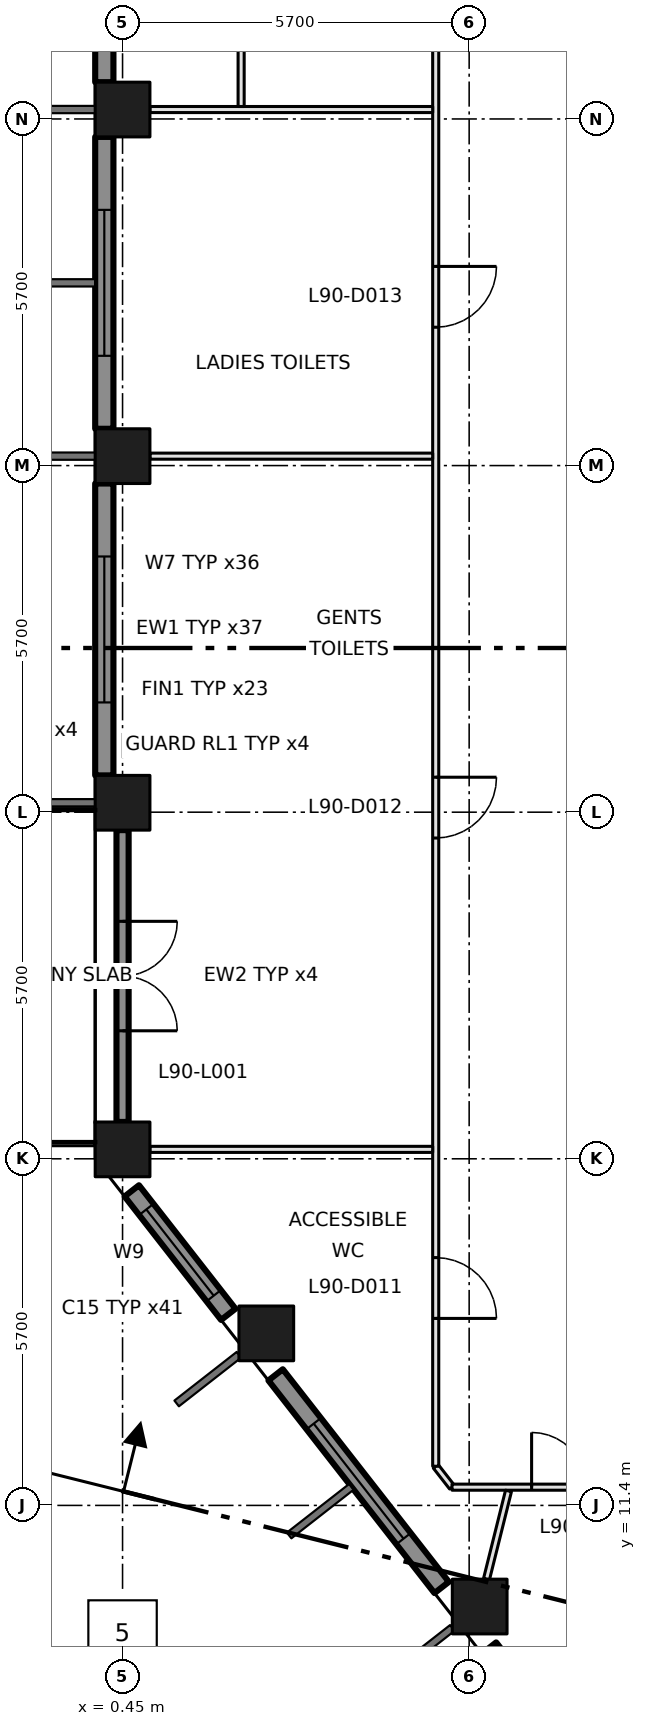
"""IFC4 building model, lengths in metres.
Left out: names, types, materials, properties, quantities, classifications, styles, units other than length and angle.
Written with IfcOpenShell. Run it as: python <this file> out.ifc"""

import sys

from ifc_helpers import new_model, si_unit, direction, frame, frame_2d, origin, origin_2d, place, context, subcontext, project, spatial, rectangle, extrude, element, fill, save


model = new_model("IFC4")
c1 = context("Model", 3, precision=1e-05, world=origin(), true_north=direction((0.0, 1.0)))
c2 = subcontext(c1, "Body", "Model", "MODEL_VIEW")
j1 = project(units=[si_unit("LENGTHUNIT", "METRE"), si_unit("PLANEANGLEUNIT", "RADIAN")], contexts=[c1])
p1 = place(None, origin())
s1 = spatial("IfcSite", under=j1, at=p1, CompositionType="ELEMENT")
p2 = place(p1, origin())
s2 = spatial("IfcBuilding", under=s1, at=p2, CompositionType="ELEMENT")
p3 = place(p2, frame((0.0, 0.0, 391.8)))
s3 = spatial("IfcBuildingStorey", under=s2, at=p3, CompositionType="ELEMENT", Elevation=391.8)
for number, where, z_axis, x_axis in (
    (1, (0.45, 17.255, 0.0), (0.0, 0.0, 1.0), (1.0, 0.0, 0.0)),
    (2, (0.45, 22.955, 0.0), (0.0, 0.0, 1.0), (1.0, 0.0, 0.0)),
    (3, (0.45, 28.655, 0.0), (0.0, 0.0, 1.0), (1.0, 0.0, 0.0)),
    (4, (0.45, 34.355, 0.0), (0.0, 0.0, 1.0), (1.0, 0.0, 0.0)),
    (5, (6.323, 9.737, 0.0), (0.0, 0.0, 1.0), (1.0, 0.0, 0.0)),
    (6, (2.814, 14.229, 0.0), (0.0, 0.0, 1.0), (1.0, 0.0, 0.0)),
):
    element("IfcColumn", number, at=place(p3, frame(where, z_axis=z_axis, x_axis=x_axis)), inside=s3, PredefinedType="COLUMN", context=c2, shape_type="SweptSolid", body=[
        extrude(rectangle(XDim=0.9, YDim=0.9, at=origin_2d()), origin(), (0.0, 0.0, 1.0), 4.2),
    ])
p4 = place(p3, frame((0.15, 39.605, 0.0), z_axis=(0.0, 0.0, 1.0), x_axis=(0.0, -1.0, 0.0)))
e7 = element("IfcWall", 7, at=p4, inside=s3, PredefinedType="SOLIDWALL", context=c2, shape_type="SweptSolid", body=[
    extrude(rectangle(XDim=4.8, YDim=0.3, at=frame_2d((2.4, 0.0))), origin(), (0.0, 0.0, 1.0), 3.2),
])
p5 = place(p4, frame((1.2, 0.0, 0.8)))
e8 = element("IfcOpeningElement", 8, at=p5, cuts=e7, PredefinedType="OPENING", context=c2, shape_type="SweptSolid", body=[
    extrude(rectangle(XDim=2.4, YDim=2.1, at=frame_2d((1.2, 1.05))), frame((0.0, 0.16, 0.0), z_axis=(0.0, -1.0, 0.0), x_axis=(1.0, 0.0, 0.0)), (0.0, 0.0, 1.0), 0.32),
])
p6 = place(p3, frame((0.15, 33.905, 0.0), z_axis=(0.0, 0.0, 1.0), x_axis=(0.0, -1.0, 0.0)))
e9 = element("IfcWall", 9, at=p6, inside=s3, PredefinedType="SOLIDWALL", context=c2, shape_type="SweptSolid", body=[
    extrude(rectangle(XDim=4.8, YDim=0.3, at=frame_2d((2.4, 0.0))), origin(), (0.0, 0.0, 1.0), 3.2),
])
p7 = place(p6, frame((1.2, 0.0, 0.8)))
e10 = element("IfcOpeningElement", 10, at=p7, cuts=e9, PredefinedType="OPENING", context=c2, shape_type="SweptSolid", body=[
    extrude(rectangle(XDim=2.4, YDim=2.1, at=frame_2d((1.2, 1.05))), frame((0.0, 0.16, 0.0), z_axis=(0.0, -1.0, 0.0), x_axis=(1.0, 0.0, 0.0)), (0.0, 0.0, 1.0), 0.32),
])
p8 = place(p3, frame((0.15, 28.205, 0.0), z_axis=(0.0, 0.0, 1.0), x_axis=(0.0, -1.0, 0.0)))
e11 = element("IfcWall", 11, at=p8, inside=s3, PredefinedType="SOLIDWALL", context=c2, shape_type="SweptSolid", body=[
    extrude(rectangle(XDim=4.8, YDim=0.3, at=frame_2d((2.4, 0.0))), origin(), (0.0, 0.0, 1.0), 3.2),
])
p9 = place(p8, frame((1.2, 0.0, 0.8)))
e12 = element("IfcOpeningElement", 12, at=p9, cuts=e11, PredefinedType="OPENING", context=c2, shape_type="SweptSolid", body=[
    extrude(rectangle(XDim=2.4, YDim=2.1, at=frame_2d((1.2, 1.05))), frame((0.0, 0.16, 0.0), z_axis=(0.0, -1.0, 0.0), x_axis=(1.0, 0.0, 0.0)), (0.0, 0.0, 1.0), 0.32),
])
p10 = place(p3, frame((0.45, 22.505, 0.0), z_axis=(0.0, 0.0, 1.0), x_axis=(0.0, -1.0, 0.0)))
e13 = element("IfcWall", 13, at=p10, inside=s3, PredefinedType="SOLIDWALL", context=c2, shape_type="SweptSolid", body=[
    extrude(rectangle(XDim=4.799, YDim=0.2, at=frame_2d((2.399, 0.0))), origin(), (0.0, 0.0, 1.0), 3.2),
])
p11 = place(p10, frame((1.5, 0.0, 0.0)))
e14 = element("IfcOpeningElement", 14, at=p11, cuts=e13, PredefinedType="OPENING", context=c2, shape_type="SweptSolid", body=[
    extrude(rectangle(XDim=1.8, YDim=2.9, at=frame_2d((0.9, 1.45))), frame((0.0, 0.11, 0.0), z_axis=(0.0, -1.0, 0.0), x_axis=(1.0, 0.0, 0.0)), (0.0, 0.0, 1.0), 0.22),
])
p12 = place(p3, frame((0.602, 16.573, 0.0), z_axis=(0.0, 0.0, 1.0), x_axis=(0.61568999437, -0.787988471256, 0.0)))
e15 = element("IfcWall", 15, at=p12, inside=s3, PredefinedType="SOLIDWALL", context=c2, shape_type="SweptSolid", body=[
    extrude(rectangle(XDim=2.577, YDim=0.3, at=frame_2d((1.289, 0.0))), origin(), (0.0, 0.0, 1.0), 3.2),
])
p13 = place(p12, frame((0.388, 0.0, 0.8)))
e16 = element("IfcOpeningElement", 16, at=p13, cuts=e15, PredefinedType="OPENING", context=c2, shape_type="SweptSolid", body=[
    extrude(rectangle(XDim=1.8, YDim=2.1, at=frame_2d((0.9, 1.05))), frame((0.0, 0.16, 0.0), z_axis=(0.0, -1.0, 0.0), x_axis=(1.0, 0.0, 0.0)), (0.0, 0.0, 1.0), 0.32),
])
p14 = place(p3, frame((2.967, 13.547, 0.0), z_axis=(0.0, 0.0, 1.0), x_axis=(0.615486001463, -0.788147817356, 0.0)))
e17 = element("IfcWall", 17, at=p14, inside=s3, PredefinedType="SOLIDWALL", context=c2, shape_type="SweptSolid", body=[
    extrude(rectangle(XDim=4.437, YDim=0.3, at=frame_2d((2.219, 0.0))), origin(), (0.0, 0.0, 1.0), 3.2),
])
p15 = place(p14, frame((1.018, 0.0, 0.8)))
e18 = element("IfcOpeningElement", 18, at=p15, cuts=e17, PredefinedType="OPENING", context=c2, shape_type="SweptSolid", body=[
    extrude(rectangle(XDim=2.4, YDim=2.1, at=frame_2d((1.2, 1.05))), frame((0.0, 0.16, 0.0), z_axis=(0.0, -1.0, 0.0), x_axis=(1.0, 0.0, 0.0)), (0.0, 0.0, 1.0), 0.32),
])
p16 = place(p3, frame((6.476, 9.055, 0.0), z_axis=(0.0, 0.0, 1.0), x_axis=(0.615649380255, -0.788020203162, 0.0)))
e19 = element("IfcWall", 19, at=p16, inside=s3, PredefinedType="SOLIDWALL", context=c2, shape_type="SweptSolid", body=[
    extrude(rectangle(XDim=4.438, YDim=0.3, at=frame_2d((2.219, 0.0))), origin(), (0.0, 0.0, 1.0), 3.2),
])
p17 = place(p16, frame((1.019, 0.0, 0.8)))
e20 = element("IfcOpeningElement", 20, at=p17, cuts=e19, PredefinedType="OPENING", context=c2, shape_type="SweptSolid", body=[
    extrude(rectangle(XDim=2.4, YDim=2.1, at=frame_2d((1.2, 1.05))), frame((0.0, 0.16, 0.0), z_axis=(0.0, -1.0, 0.0), x_axis=(1.0, 0.0, 0.0)), (0.0, 0.0, 1.0), 0.32),
])
p18 = place(p3, frame((5.6, 12.044, 0.0), z_axis=(0.0, 0.0, 1.0), x_axis=(0.614328236968, -0.789050579661, 0.0)))
e21 = element("IfcWall", 21, at=p18, inside=s3, PredefinedType="PARTITIONING", context=c2, shape_type="SweptSolid", body=[
    extrude(rectangle(XDim=0.436, YDim=0.1, at=frame_2d((0.218, 0.0))), origin(), (0.0, 0.0, 1.0), 3.9),
])
p19 = place(p3, frame((5.6, 39.77, 0.0), z_axis=(0.0, 0.0, 1.0), x_axis=(0.0, -1.0, 0.0)))
e22 = element("IfcWall", 22, at=p19, inside=s3, PredefinedType="PARTITIONING", context=c2, shape_type="SweptSolid", body=[
    extrude(rectangle(XDim=27.726, YDim=0.1, at=frame_2d((13.863, 0.0))), origin(), (0.0, 0.0, 1.0), 3.9),
])
p20 = place(p19, frame((24.295, 0.0, 0.0)))
e23 = element("IfcOpeningElement", 23, at=p20, cuts=e22, PredefinedType="OPENING", context=c2, shape_type="SweptSolid", body=[
    extrude(rectangle(XDim=1.0, YDim=2.1, at=frame_2d((0.5, 1.05))), frame((0.0, 0.06, 0.0), z_axis=(0.0, -1.0, 0.0), x_axis=(1.0, 0.0, 0.0)), (0.0, 0.0, 1.0), 0.12),
])
p21 = place(p19, frame((16.395, 0.0, 0.0)))
e24 = element("IfcOpeningElement", 24, at=p21, cuts=e22, PredefinedType="OPENING", context=c2, shape_type="SweptSolid", body=[
    extrude(rectangle(XDim=1.0, YDim=2.1, at=frame_2d((0.5, 1.05))), frame((0.0, 0.06, 0.0), z_axis=(0.0, -1.0, 0.0), x_axis=(1.0, 0.0, 0.0)), (0.0, 0.0, 1.0), 0.12),
])
p22 = place(p19, frame((7.995, 0.0, 0.0)))
e25 = element("IfcOpeningElement", 25, at=p22, cuts=e22, PredefinedType="OPENING", context=c2, shape_type="SweptSolid", body=[
    extrude(rectangle(XDim=1.0, YDim=2.1, at=frame_2d((0.5, 1.05))), frame((0.0, 0.06, 0.0), z_axis=(0.0, -1.0, 0.0), x_axis=(1.0, 0.0, 0.0)), (0.0, 0.0, 1.0), 0.12),
])
p23 = place(p19, frame((2.38, 0.0, 0.0)))
e26 = element("IfcOpeningElement", 26, at=p23, cuts=e22, PredefinedType="OPENING", context=c2, shape_type="SweptSolid", body=[
    extrude(rectangle(XDim=1.0, YDim=2.1, at=frame_2d((0.5, 1.05))), frame((0.0, 0.06, 0.0), z_axis=(0.0, -1.0, 0.0), x_axis=(1.0, 0.0, 0.0)), (0.0, 0.0, 1.0), 0.12),
])
p24 = place(p3, frame((5.868, 11.7, 0.0), z_axis=(0.0, 0.0, 1.0), x_axis=(1.0, 0.0, 0.0)))
e27 = element("IfcWall", 27, at=p24, inside=s3, PredefinedType="PARTITIONING", context=c2, shape_type="SweptSolid", body=[
    extrude(rectangle(XDim=3.433, YDim=0.1, at=frame_2d((1.717, 0.0))), origin(), (0.0, 0.0, 1.0), 3.9),
])
p25 = place(p24, frame((1.309, 0.0, 0.0)))
e28 = element("IfcOpeningElement", 28, at=p25, cuts=e27, PredefinedType="OPENING", context=c2, shape_type="SweptSolid", body=[
    extrude(rectangle(XDim=1.8, YDim=2.1, at=frame_2d((0.9, 1.05))), frame((0.0, 0.06, 0.0), z_axis=(0.0, -1.0, 0.0), x_axis=(1.0, 0.0, 0.0)), (0.0, 0.0, 1.0), 0.12),
])
p26 = place(p3, frame((0.9, 34.355, 0.0), z_axis=(0.0, 0.0, 1.0), x_axis=(1.0, 0.0, 0.0)))
e29 = element("IfcWall", 29, at=p26, inside=s3, PredefinedType="PARTITIONING", context=c2, shape_type="SweptSolid", body=[
    extrude(rectangle(XDim=4.65, YDim=0.1, at=frame_2d((2.325, 0.0))), origin(), (0.0, 0.0, 1.0), 3.9),
])
p27 = place(p3, frame((2.4, 34.405, 0.0), z_axis=(0.0, 0.0, 1.0), x_axis=(0.0, 1.0, 0.0)))
e30 = element("IfcWall", 30, at=p27, inside=s3, PredefinedType="PARTITIONING", context=c2, shape_type="SweptSolid", body=[
    extrude(rectangle(XDim=5.369, YDim=0.1, at=frame_2d((2.685, 0.0))), origin(), (0.0, 0.0, 1.0), 3.9),
])
for number, where, z_axis, x_axis in (
    (31, (5.55, 17.255, 0.0), (0.0, 0.0, 1.0), (-1.0, 0.0, 0.0)),
    (32, (5.55, 28.655, 0.0), (0.0, 0.0, 1.0), (-1.0, 0.0, 0.0)),
):
    element("IfcWall", number, at=place(p3, frame(where, z_axis=z_axis, x_axis=x_axis)), inside=s3, PredefinedType="PARTITIONING", context=c2, shape_type="SweptSolid", body=[
        extrude(rectangle(XDim=4.65, YDim=0.1, at=frame_2d((2.325, 0.0))), origin(), (0.0, 0.0, 1.0), 3.9),
    ])
p28 = place(p3, frame((6.797, 11.638, 0.0), z_axis=(0.0, 0.0, 1.0), x_axis=(-0.242113049408, -0.970248046278, 0.0)))
e33 = element("IfcWall", 33, at=p28, inside=s3, PredefinedType="PARTITIONING", context=c2, shape_type="SweptSolid", body=[
    extrude(rectangle(XDim=1.495, YDim=0.1, at=frame_2d((0.748, 0.0))), origin(), (0.0, 0.0, 1.0), 3.9),
])
p29 = place(p7, origin())
e34 = element("IfcWindow", 34, at=p29, inside=s3, PartitioningType="DOUBLE_PANEL_VERTICAL", PredefinedType="WINDOW", context=c2, shape_type="SweptSolid", body=[
    extrude(rectangle(XDim=2.4, YDim=2.1, at=frame_2d((1.2, 1.05))), frame((0.0, 0.03, 0.0), z_axis=(0.0, -1.0, 0.0), x_axis=(1.0, 0.0, 0.0)), (0.0, 0.0, 1.0), 0.06),
])
fill(e10, e34)
p30 = place(p9, origin())
e35 = element("IfcWindow", 35, at=p30, inside=s3, PartitioningType="DOUBLE_PANEL_VERTICAL", PredefinedType="WINDOW", context=c2, shape_type="SweptSolid", body=[
    extrude(rectangle(XDim=2.4, YDim=2.1, at=frame_2d((1.2, 1.05))), frame((0.0, 0.03, 0.0), z_axis=(0.0, -1.0, 0.0), x_axis=(1.0, 0.0, 0.0)), (0.0, 0.0, 1.0), 0.06),
])
fill(e12, e35)
p31 = place(p11, origin())
e36 = element("IfcDoor", 36, at=p31, inside=s3, OperationType="DOUBLE_DOOR_SINGLE_SWING", PredefinedType="DOOR", context=c2, shape_type="SweptSolid", body=[
    extrude(rectangle(XDim=1.8, YDim=2.9, at=frame_2d((0.9, 1.45))), frame((0.0, 0.025, 0.0), z_axis=(0.0, -1.0, 0.0), x_axis=(1.0, 0.0, 0.0)), (0.0, 0.0, 1.0), 0.05),
])
fill(e14, e36)
p32 = place(p13, origin())
e37 = element("IfcWindow", 37, at=p32, inside=s3, PartitioningType="DOUBLE_PANEL_VERTICAL", PredefinedType="WINDOW", context=c2, shape_type="SweptSolid", body=[
    extrude(rectangle(XDim=1.8, YDim=2.1, at=frame_2d((0.9, 1.05))), frame((0.0, 0.03, 0.0), z_axis=(0.0, -1.0, 0.0), x_axis=(1.0, 0.0, 0.0)), (0.0, 0.0, 1.0), 0.06),
])
fill(e16, e37)
p33 = place(p15, origin())
e38 = element("IfcWindow", 38, at=p33, inside=s3, PartitioningType="DOUBLE_PANEL_VERTICAL", PredefinedType="WINDOW", context=c2, shape_type="SweptSolid", body=[
    extrude(rectangle(XDim=2.4, YDim=2.1, at=frame_2d((1.2, 1.05))), frame((0.0, 0.03, 0.0), z_axis=(0.0, -1.0, 0.0), x_axis=(1.0, 0.0, 0.0)), (0.0, 0.0, 1.0), 0.06),
])
fill(e18, e38)
p34 = place(p25, origin())
e39 = element("IfcDoor", 39, at=p34, inside=s3, OperationType="DOUBLE_DOOR_SINGLE_SWING", PredefinedType="DOOR", context=c2, shape_type="SweptSolid", body=[
    extrude(rectangle(XDim=1.8, YDim=2.1, at=frame_2d((0.9, 1.05))), frame((0.0, 0.025, 0.0), z_axis=(0.0, -1.0, 0.0), x_axis=(1.0, 0.0, 0.0)), (0.0, 0.0, 1.0), 0.05),
])
fill(e28, e39)
p35 = place(p20, origin())
e40 = element("IfcDoor", 40, at=p35, inside=s3, OperationType="SINGLE_SWING_RIGHT", PredefinedType="DOOR", context=c2, shape_type="SweptSolid", body=[
    extrude(rectangle(XDim=1.0, YDim=2.1, at=frame_2d((0.5, 1.05))), frame((0.0, 0.025, 0.0), z_axis=(0.0, -1.0, 0.0), x_axis=(1.0, 0.0, 0.0)), (0.0, 0.0, 1.0), 0.05),
])
fill(e23, e40)
p36 = place(p21, origin())
e41 = element("IfcDoor", 41, at=p36, inside=s3, OperationType="SINGLE_SWING_LEFT", PredefinedType="DOOR", context=c2, shape_type="SweptSolid", body=[
    extrude(rectangle(XDim=1.0, YDim=2.1, at=frame_2d((0.5, 1.05))), frame((0.0, 0.025, 0.0), z_axis=(0.0, -1.0, 0.0), x_axis=(1.0, 0.0, 0.0)), (0.0, 0.0, 1.0), 0.05),
])
fill(e24, e41)
p37 = place(p22, origin())
e42 = element("IfcDoor", 42, at=p37, inside=s3, OperationType="SINGLE_SWING_LEFT", PredefinedType="DOOR", context=c2, shape_type="SweptSolid", body=[
    extrude(rectangle(XDim=1.0, YDim=2.1, at=frame_2d((0.5, 1.05))), frame((0.0, 0.025, 0.0), z_axis=(0.0, -1.0, 0.0), x_axis=(1.0, 0.0, 0.0)), (0.0, 0.0, 1.0), 0.05),
])
fill(e25, e42)
save(model, sys.argv[1])
